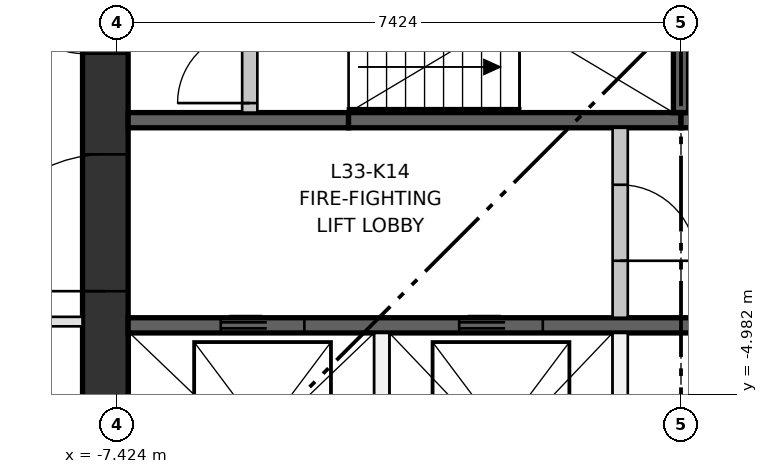
"""IFC4 building model, lengths in metres.
Left out: names, types, materials, properties, quantities, classifications, styles, units other than length and angle.
Written with IfcOpenShell. Run it as: python <this file> out.ifc"""

import sys

from ifc_helpers import new_model, si_unit, direction, frame, frame_2d, origin, place, context, subcontext, project, spatial, rectangle, extrude, element, fill, save


model = new_model("IFC4")
c1 = context("Model", 3, precision=1e-05, world=origin(), true_north=direction((0.0, 1.0)))
c2 = subcontext(c1, "Body", "Model", "MODEL_VIEW")
j1 = project(units=[si_unit("LENGTHUNIT", "METRE"), si_unit("PLANEANGLEUNIT", "RADIAN")], contexts=[c1])
p1 = place(None, origin())
s1 = spatial("IfcSite", under=j1, at=p1, CompositionType="ELEMENT")
p2 = place(p1, origin())
s2 = spatial("IfcBuilding", under=s1, at=p2, CompositionType="ELEMENT")
p3 = place(p2, frame((0.0, 0.0, 127.65)))
s3 = spatial("IfcBuildingStorey", under=s2, at=p3, CompositionType="ELEMENT", Elevation=127.65)
p4 = place(p3, frame((-7.574, -7.274, 0.0), z_axis=(0.0, 0.0, 1.0), x_axis=(0.0, 1.0, 0.0)))
e1 = element("IfcWall", 1, at=p4, inside=s3, PredefinedType="SHEAR", context=c2, shape_type="SweptSolid", body=[
    extrude(rectangle(XDim=14.548, YDim=0.6, at=frame_2d((7.274, 0.0))), origin(), (0.0, 0.0, 1.0), 3.35),
])
p5 = place(p4, frame((6.774, 0.0, 0.0)))
e2 = element("IfcOpeningElement", 2, at=p5, cuts=e1, PredefinedType="OPENING", context=c2, shape_type="SweptSolid", body=[
    extrude(rectangle(XDim=1.0, YDim=2.1, at=frame_2d((0.5, 1.05))), frame((0.0, 0.31, 0.0), z_axis=(0.0, -1.0, 0.0), x_axis=(1.0, 0.0, 0.0)), (0.0, 0.0, 1.0), 0.62),
])
p6 = place(p4, frame((3.649, 0.0, 0.0)))
e3 = element("IfcOpeningElement", 3, at=p6, cuts=e1, PredefinedType="OPENING", context=c2, shape_type="SweptSolid", body=[
    extrude(rectangle(XDim=1.8, YDim=2.1, at=frame_2d((0.9, 1.05))), frame((0.0, 0.31, 0.0), z_axis=(0.0, -1.0, 0.0), x_axis=(1.0, 0.0, 0.0)), (0.0, 0.0, 1.0), 0.62),
])
p7 = place(p4, frame((9.098, 0.0, 0.0)))
e4 = element("IfcOpeningElement", 4, at=p7, cuts=e1, PredefinedType="OPENING", context=c2, shape_type="SweptSolid", body=[
    extrude(rectangle(XDim=1.8, YDim=2.1, at=frame_2d((0.9, 1.05))), frame((0.0, 0.31, 0.0), z_axis=(0.0, -1.0, 0.0), x_axis=(1.0, 0.0, 0.0)), (0.0, 0.0, 1.0), 0.62),
])
p8 = place(p3, frame((-7.274, -4.074, 0.0), z_axis=(0.0, 0.0, 1.0), x_axis=(1.0, 0.0, 0.0)))
e5 = element("IfcWall", 5, at=p8, inside=s3, PredefinedType="SHEAR", context=c2, shape_type="SweptSolid", body=[
    extrude(rectangle(XDim=14.548, YDim=0.2, at=frame_2d((7.274, 0.0))), origin(), (0.0, 0.0, 1.0), 3.0),
])
p9 = place(p8, frame((1.219, 0.0, 0.0)))
e6 = element("IfcOpeningElement", 6, at=p9, cuts=e5, PredefinedType="OPENING", context=c2, shape_type="SweptSolid", body=[
    extrude(rectangle(XDim=1.1, YDim=2.1, at=frame_2d((0.55, 1.05))), frame((0.0, 0.11, 0.0), z_axis=(0.0, -1.0, 0.0), x_axis=(1.0, 0.0, 0.0)), (0.0, 0.0, 1.0), 0.22),
])
p10 = place(p8, frame((4.355, 0.0, 0.0)))
e7 = element("IfcOpeningElement", 7, at=p10, cuts=e5, PredefinedType="OPENING", context=c2, shape_type="SweptSolid", body=[
    extrude(rectangle(XDim=1.1, YDim=2.1, at=frame_2d((0.55, 1.05))), frame((0.0, 0.11, 0.0), z_axis=(0.0, -1.0, 0.0), x_axis=(1.0, 0.0, 0.0)), (0.0, 0.0, 1.0), 0.22),
])
p11 = place(p8, frame((7.795, 0.0, 0.0)))
e8 = element("IfcOpeningElement", 8, at=p11, cuts=e5, PredefinedType="OPENING", context=c2, shape_type="SweptSolid", body=[
    extrude(rectangle(XDim=1.0, YDim=2.1, at=frame_2d((0.5, 1.05))), frame((0.0, 0.11, 0.0), z_axis=(0.0, -1.0, 0.0), x_axis=(1.0, 0.0, 0.0)), (0.0, 0.0, 1.0), 0.22),
])
p12 = place(p8, frame((10.356, 0.0, 0.0)))
e9 = element("IfcOpeningElement", 9, at=p12, cuts=e5, PredefinedType="OPENING", context=c2, shape_type="SweptSolid", body=[
    extrude(rectangle(XDim=1.0, YDim=2.1, at=frame_2d((0.5, 1.05))), frame((0.0, 0.11, 0.0), z_axis=(0.0, -1.0, 0.0), x_axis=(1.0, 0.0, 0.0)), (0.0, 0.0, 1.0), 0.22),
])
p13 = place(p8, frame((12.722, 0.0, 0.0)))
e10 = element("IfcOpeningElement", 10, at=p13, cuts=e5, PredefinedType="OPENING", context=c2, shape_type="SweptSolid", body=[
    extrude(rectangle(XDim=0.8, YDim=2.1, at=frame_2d((0.4, 1.05))), frame((0.0, 0.11, 0.0), z_axis=(0.0, -1.0, 0.0), x_axis=(1.0, 0.0, 0.0)), (0.0, 0.0, 1.0), 0.22),
])
p14 = place(p3, frame((-7.274, -1.375, 0.0), z_axis=(0.0, 0.0, 1.0), x_axis=(1.0, 0.0, 0.0)))
e11 = element("IfcWall", 11, at=p14, inside=s3, PredefinedType="SHEAR", context=c2, shape_type="SweptSolid", body=[
    extrude(rectangle(XDim=2.9, YDim=0.2, at=frame_2d((1.45, 0.0))), origin(), (0.0, 0.0, 1.0), 3.0),
])
for number, where, z_axis, x_axis in (
    (12, (-4.374, -1.375, 0.0), (0.0, 0.0, 1.0), (1.0, 0.0, 0.0)),
    (13, (0.0, -1.375, 0.0), (0.0, 0.0, 1.0), (1.0, 0.0, 0.0)),
):
    element("IfcWall", number, at=place(p3, frame(where, z_axis=z_axis, x_axis=x_axis)), inside=s3, PredefinedType="SHEAR", context=c2, shape_type="SweptSolid", body=[
        extrude(rectangle(XDim=4.374, YDim=0.2, at=frame_2d((2.187, 0.0))), origin(), (0.0, 0.0, 1.0), 3.0),
    ])
p15 = place(p3, frame((0.0, -1.275, 0.0), z_axis=(0.0, 0.0, 1.0), x_axis=(0.0, 1.0, 0.0)))
e14 = element("IfcWall", 14, at=p15, inside=s3, PredefinedType="SHEAR", context=c2, shape_type="SweptSolid", body=[
    extrude(rectangle(XDim=2.55, YDim=0.2, at=frame_2d((1.275, 0.0))), origin(), (0.0, 0.0, 1.0), 3.0),
])
for number, where, z_axis, x_axis in (
    (15, (-3.937, -7.274, 0.0), (0.0, 0.0, 1.0), (0.0, 1.0, 0.0)),
    (16, (-0.8, -7.274, 0.0), (0.0, 0.0, 1.0), (0.0, 1.0, 0.0)),
):
    element("IfcWall", number, at=place(p3, frame(where, z_axis=z_axis, x_axis=x_axis)), inside=s3, PredefinedType="PARTITIONING", context=c2, shape_type="SweptSolid", body=[
        extrude(rectangle(XDim=3.1, YDim=0.2, at=frame_2d((1.55, 0.0))), origin(), (0.0, 0.0, 1.0), 3.0),
    ])
p16 = place(p3, frame((-0.8, -3.974, 0.0), z_axis=(0.0, 0.0, 1.0), x_axis=(0.0, 1.0, 0.0)))
e17 = element("IfcWall", 17, at=p16, inside=s3, PredefinedType="PARTITIONING", context=c2, shape_type="SweptSolid", body=[
    extrude(rectangle(XDim=2.499, YDim=0.2, at=frame_2d((1.25, 0.0))), origin(), (0.0, 0.0, 1.0), 3.0),
])
p17 = place(p16, frame((0.75, 0.0, 0.0)))
e18 = element("IfcOpeningElement", 18, at=p17, cuts=e17, PredefinedType="OPENING", context=c2, shape_type="SweptSolid", body=[
    extrude(rectangle(XDim=1.0, YDim=2.1, at=frame_2d((0.5, 1.05))), frame((0.0, 0.11, 0.0), z_axis=(0.0, -1.0, 0.0), x_axis=(1.0, 0.0, 0.0)), (0.0, 0.0, 1.0), 0.22),
])
p18 = place(p3, frame((-5.674, -1.275, 0.0), z_axis=(0.0, 0.0, 1.0), x_axis=(0.0, 1.0, 0.0)))
e19 = element("IfcWall", 19, at=p18, inside=s3, PredefinedType="PARTITIONING", context=c2, shape_type="SweptSolid", body=[
    extrude(rectangle(XDim=2.55, YDim=0.2, at=frame_2d((1.275, 0.0))), origin(), (0.0, 0.0, 1.0), 3.0),
])
p19 = place(p18, frame((0.125, 0.0, 0.0)))
e20 = element("IfcOpeningElement", 20, at=p19, cuts=e19, PredefinedType="OPENING", context=c2, shape_type="SweptSolid", body=[
    extrude(rectangle(XDim=0.95, YDim=2.1, at=frame_2d((0.475, 1.05))), frame((0.0, 0.11, 0.0), z_axis=(0.0, -1.0, 0.0), x_axis=(1.0, 0.0, 0.0)), (0.0, 0.0, 1.0), 0.22),
])
p20 = place(p18, frame((1.475, 0.0, 0.0)))
e21 = element("IfcOpeningElement", 21, at=p20, cuts=e19, PredefinedType="OPENING", context=c2, shape_type="SweptSolid", body=[
    extrude(rectangle(XDim=0.95, YDim=2.1, at=frame_2d((0.475, 1.05))), frame((0.0, 0.11, 0.0), z_axis=(0.0, -1.0, 0.0), x_axis=(1.0, 0.0, 0.0)), (0.0, 0.0, 1.0), 0.22),
])
p21 = place(p3, frame((-7.874, -4.024, 0.0), z_axis=(0.0, 0.0, 1.0), x_axis=(-1.0, 0.0, 0.0)))
e22 = element("IfcWall", 22, at=p21, inside=s3, PredefinedType="PARTITIONING", context=c2, shape_type="SweptSolid", body=[
    extrude(rectangle(XDim=5.91, YDim=0.125, at=frame_2d((2.955, 0.0))), origin(), (0.0, 0.0, 1.0), 3.0),
])
p22 = place(p21, frame((2.5, 0.0, 0.0)))
e23 = element("IfcOpeningElement", 23, at=p22, cuts=e22, PredefinedType="OPENING", context=c2, shape_type="SweptSolid", body=[
    extrude(rectangle(XDim=1.0, YDim=2.1, at=frame_2d((0.5, 1.05))), frame((0.0, 0.073, 0.0), z_axis=(0.0, -1.0, 0.0), x_axis=(1.0, 0.0, 0.0)), (0.0, 0.0, 1.0), 0.145),
])
p23 = place(p9, origin())
e24 = element("IfcDoor", 24, at=p23, inside=s3, OperationType="DOUBLE_DOOR_SLIDING", PredefinedType="DOOR", context=c2, shape_type="SweptSolid", body=[
    extrude(rectangle(XDim=1.1, YDim=2.1, at=frame_2d((0.55, 1.05))), frame((0.0, 0.025, 0.0), z_axis=(0.0, -1.0, 0.0), x_axis=(1.0, 0.0, 0.0)), (0.0, 0.0, 1.0), 0.05),
])
fill(e6, e24)
p24 = place(p10, origin())
e25 = element("IfcDoor", 25, at=p24, inside=s3, OperationType="DOUBLE_DOOR_SLIDING", PredefinedType="DOOR", context=c2, shape_type="SweptSolid", body=[
    extrude(rectangle(XDim=1.1, YDim=2.1, at=frame_2d((0.55, 1.05))), frame((0.0, 0.025, 0.0), z_axis=(0.0, -1.0, 0.0), x_axis=(1.0, 0.0, 0.0)), (0.0, 0.0, 1.0), 0.05),
])
fill(e7, e25)
p25 = place(p19, origin())
e26 = element("IfcDoor", 26, at=p25, inside=s3, OperationType="SINGLE_SWING_LEFT", PredefinedType="DOOR", context=c2, shape_type="SweptSolid", body=[
    extrude(rectangle(XDim=0.95, YDim=2.1, at=frame_2d((0.475, 1.05))), frame((0.0, 0.025, 0.0), z_axis=(0.0, -1.0, 0.0), x_axis=(1.0, 0.0, 0.0)), (0.0, 0.0, 1.0), 0.05),
])
fill(e20, e26)
p26 = place(p17, frame((1.0, 0.0, 0.0), z_axis=(0.0, 0.0, 1.0), x_axis=(-1.0, 0.0, 0.0)))
e27 = element("IfcDoor", 27, at=p26, inside=s3, OperationType="SINGLE_SWING_LEFT", PredefinedType="DOOR", context=c2, shape_type="SweptSolid", body=[
    extrude(rectangle(XDim=1.0, YDim=2.1, at=frame_2d((0.5, 1.05))), frame((0.0, 0.025, 0.0), z_axis=(0.0, -1.0, 0.0), x_axis=(1.0, 0.0, 0.0)), (0.0, 0.0, 1.0), 0.05),
])
fill(e18, e27)
p27 = place(p5, origin())
e28 = element("IfcDoor", 28, at=p27, inside=s3, OperationType="SINGLE_SWING_RIGHT", PredefinedType="DOOR", context=c2, shape_type="SweptSolid", body=[
    extrude(rectangle(XDim=1.0, YDim=2.1, at=frame_2d((0.5, 1.05))), frame((0.0, 0.3, 0.0), z_axis=(0.0, -1.0, 0.0), x_axis=(1.0, 0.0, 0.0)), (0.0, 0.0, 1.0), 0.05),
])
fill(e2, e28)
p28 = place(p6, origin())
e29 = element("IfcDoor", 29, at=p28, inside=s3, OperationType="DOUBLE_DOOR_SINGLE_SWING", PredefinedType="DOOR", context=c2, shape_type="SweptSolid", body=[
    extrude(rectangle(XDim=1.8, YDim=2.1, at=frame_2d((0.9, 1.05))), frame((0.0, 0.025, 0.0), z_axis=(0.0, -1.0, 0.0), x_axis=(1.0, 0.0, 0.0)), (0.0, 0.0, 1.0), 0.05),
])
fill(e3, e29)
save(model, sys.argv[1])
